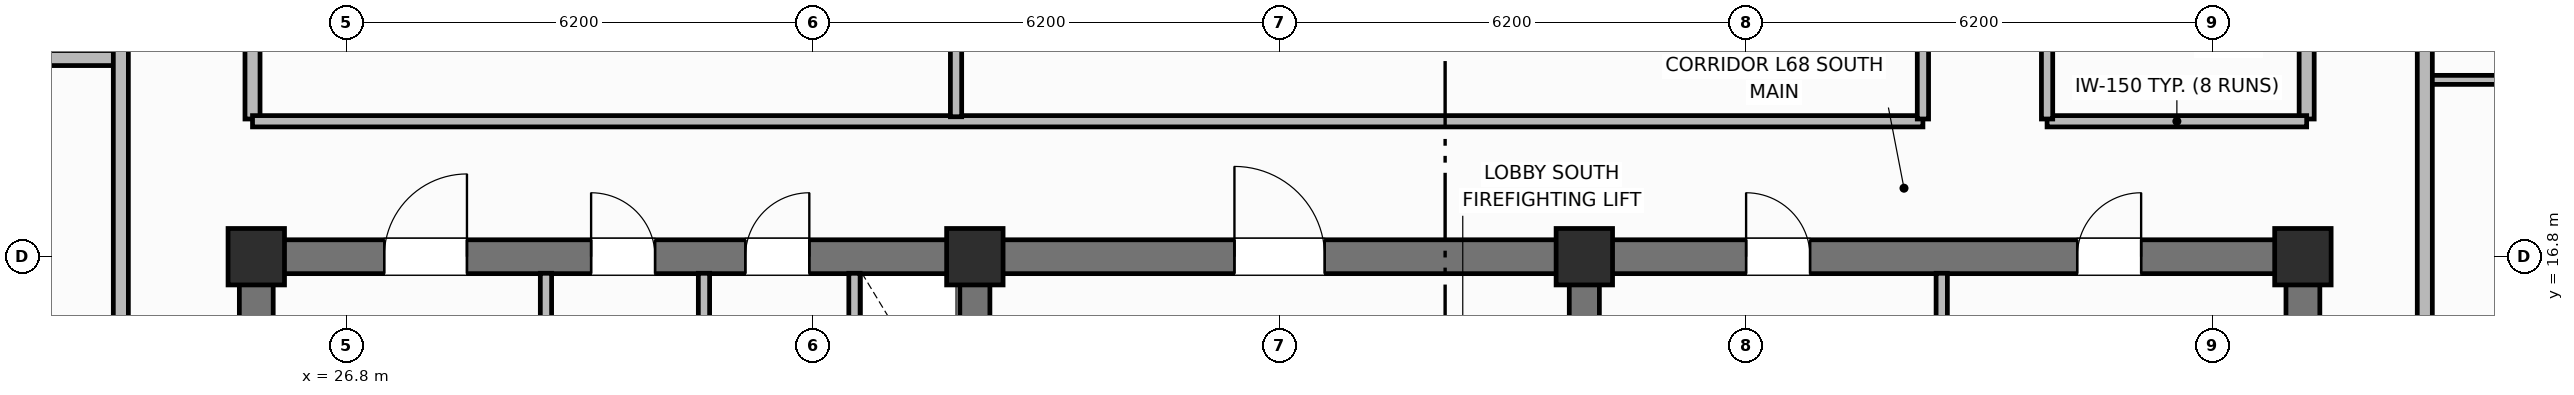
"""IFC4 building model, lengths in metres.
Left out: names, types, materials, properties, quantities, classifications, styles, units other than length and angle.
Written with IfcOpenShell. Run it as: python <this file> out.ifc"""

import sys

from ifc_helpers import new_model, si_unit, direction, frame, frame_2d, origin, origin_2d, place, context, subcontext, project, spatial, rectangle, extrude, element, fill, save


model = new_model("IFC4")
c1 = context("Model", 3, precision=1e-05, world=origin(), true_north=direction((0.0, 1.0)))
c2 = subcontext(c1, "Body", "Model", "MODEL_VIEW")
j1 = project(units=[si_unit("LENGTHUNIT", "METRE"), si_unit("PLANEANGLEUNIT", "RADIAN")], contexts=[c1])
p1 = place(None, origin())
s1 = spatial("IfcSite", under=j1, at=p1, CompositionType="ELEMENT")
p2 = place(p1, origin())
s2 = spatial("IfcBuilding", under=s1, at=p2, CompositionType="ELEMENT")
p3 = place(p2, frame((0.0, 0.0, 271.3)))
s3 = spatial("IfcBuildingStorey", under=s2, at=p3, CompositionType="ELEMENT", Elevation=271.3)
for number, where, z_axis, x_axis in (
    (1, (25.6, 10.825, 0.0), (0.0, 0.0, 1.0), (0.0, 1.0, 0.0)),
    (2, (52.8, 10.825, 0.0), (0.0, 0.0, 1.0), (0.0, 1.0, 0.0)),
):
    element("IfcWall", number, at=place(p3, frame(where, z_axis=z_axis, x_axis=x_axis)), inside=s3, PredefinedType="SHEAR", context=c2, shape_type="SweptSolid", body=[
        extrude(rectangle(XDim=5.75, YDim=0.45, at=frame_2d((2.875, 0.0))), origin(), (0.0, 0.0, 1.0), 3.7),
    ])
p4 = place(p3, frame((25.6, 16.8, 0.0), z_axis=(0.0, 0.0, 1.0), x_axis=(1.0, 0.0, 0.0)))
e3 = element("IfcWall", 3, at=p4, inside=s3, PredefinedType="SHEAR", context=c2, shape_type="SweptSolid", body=[
    extrude(rectangle(XDim=27.2, YDim=0.45, at=frame_2d((13.6, 0.0))), origin(), (0.0, 0.0, 1.0), 3.7),
])
p5 = place(p4, frame((1.7, 0.0, 0.0)))
e4 = element("IfcOpeningElement", 4, at=p5, cuts=e3, PredefinedType="OPENING", context=c2, shape_type="SweptSolid", body=[
    extrude(rectangle(XDim=1.1, YDim=2.15, at=frame_2d((0.55, 1.075))), frame((0.0, 0.235, 0.0), z_axis=(0.0, -1.0, 0.0), x_axis=(1.0, 0.0, 0.0)), (0.0, 0.0, 1.0), 0.47),
])
p6 = place(p4, frame((4.45, 0.0, 0.0)))
e5 = element("IfcOpeningElement", 5, at=p6, cuts=e3, PredefinedType="OPENING", context=c2, shape_type="SweptSolid", body=[
    extrude(rectangle(XDim=0.85, YDim=2.1, at=frame_2d((0.425, 1.05))), frame((0.0, 0.235, 0.0), z_axis=(0.0, -1.0, 0.0), x_axis=(1.0, 0.0, 0.0)), (0.0, 0.0, 1.0), 0.47),
])
p7 = place(p4, frame((6.5, 0.0, 0.0)))
e6 = element("IfcOpeningElement", 6, at=p7, cuts=e3, PredefinedType="OPENING", context=c2, shape_type="SweptSolid", body=[
    extrude(rectangle(XDim=0.85, YDim=2.1, at=frame_2d((0.425, 1.05))), frame((0.0, 0.235, 0.0), z_axis=(0.0, -1.0, 0.0), x_axis=(1.0, 0.0, 0.0)), (0.0, 0.0, 1.0), 0.47),
])
p8 = place(p4, frame((13.0, 0.0, 0.0)))
e7 = element("IfcOpeningElement", 7, at=p8, cuts=e3, PredefinedType="OPENING", context=c2, shape_type="SweptSolid", body=[
    extrude(rectangle(XDim=1.2, YDim=2.15, at=frame_2d((0.6, 1.075))), frame((0.0, 0.235, 0.0), z_axis=(0.0, -1.0, 0.0), x_axis=(1.0, 0.0, 0.0)), (0.0, 0.0, 1.0), 0.47),
])
p9 = place(p4, frame((19.8, 0.0, 0.0)))
e8 = element("IfcOpeningElement", 8, at=p9, cuts=e3, PredefinedType="OPENING", context=c2, shape_type="SweptSolid", body=[
    extrude(rectangle(XDim=0.85, YDim=2.1, at=frame_2d((0.425, 1.05))), frame((0.0, 0.235, 0.0), z_axis=(0.0, -1.0, 0.0), x_axis=(1.0, 0.0, 0.0)), (0.0, 0.0, 1.0), 0.47),
])
p10 = place(p4, frame((24.2, 0.0, 0.0)))
e9 = element("IfcOpeningElement", 9, at=p10, cuts=e3, PredefinedType="OPENING", context=c2, shape_type="SweptSolid", body=[
    extrude(rectangle(XDim=0.85, YDim=2.1, at=frame_2d((0.425, 1.05))), frame((0.0, 0.235, 0.0), z_axis=(0.0, -1.0, 0.0), x_axis=(1.0, 0.0, 0.0)), (0.0, 0.0, 1.0), 0.47),
])
for number, where, z_axis, x_axis in (
    (10, (35.15, 10.825, 0.0), (0.0, 0.0, 1.0), (0.0, 1.0, 0.0)),
    (11, (43.25, 10.825, 0.0), (0.0, 0.0, 1.0), (0.0, 1.0, 0.0)),
):
    element("IfcWall", number, at=place(p3, frame(where, z_axis=z_axis, x_axis=x_axis)), inside=s3, PredefinedType="SHEAR", context=c2, shape_type="SweptSolid", body=[
        extrude(rectangle(XDim=5.75, YDim=0.4, at=frame_2d((2.875, 0.0))), origin(), (0.0, 0.0, 1.0), 3.7),
    ])
for number, where, z_axis, x_axis in (
    (12, (25.6, 16.8, 0.0), (0.0, 0.0, 1.0), (1.0, 0.0, 0.0)),
    (13, (35.15, 16.8, 0.0), (0.0, 0.0, 1.0), (1.0, 0.0, 0.0)),
    (14, (43.25, 16.8, 0.0), (0.0, 0.0, 1.0), (1.0, 0.0, 0.0)),
    (15, (52.8, 16.8, 0.0), (0.0, 0.0, 1.0), (1.0, 0.0, 0.0)),
):
    element("IfcColumn", number, at=place(p3, frame(where, z_axis=z_axis, x_axis=x_axis)), inside=s3, PredefinedType="COLUMN", context=c2, shape_type="SweptSolid", body=[
        extrude(rectangle(XDim=0.75, YDim=0.75, at=origin_2d()), origin(), (0.0, 0.0, 1.0), 3.7),
    ])
for number, where, z_axis, x_axis in (
    (16, (29.45, 14.5, 0.0), (0.0, 0.0, 1.0), (0.0, 1.0, 0.0)),
    (17, (31.55, 14.5, 0.0), (0.0, 0.0, 1.0), (0.0, 1.0, 0.0)),
):
    element("IfcWall", number, at=place(p3, frame(where, z_axis=z_axis, x_axis=x_axis)), inside=s3, PredefinedType="PARTITIONING", context=c2, shape_type="SweptSolid", body=[
        extrude(rectangle(XDim=2.08, YDim=0.15, at=frame_2d((1.04, 0.0))), origin(), (0.0, 0.0, 1.0), 2.56),
    ])
p11 = place(p3, frame((33.55, 14.5, 0.0), z_axis=(0.0, 0.0, 1.0), x_axis=(0.0, 1.0, 0.0)))
e18 = element("IfcWall", 18, at=p11, inside=s3, PredefinedType="PARTITIONING", context=c2, shape_type="SweptSolid", body=[
    extrude(rectangle(XDim=2.08, YDim=0.15, at=frame_2d((1.04, 0.0))), origin(), (0.0, 0.0, 1.0), 2.56),
])
p12 = place(p11, frame((0.55, 0.0, 0.0)))
e19 = element("IfcOpeningElement", 19, at=p12, cuts=e18, PredefinedType="OPENING", context=c2, shape_type="SweptSolid", body=[
    extrude(rectangle(XDim=0.85, YDim=2.05, at=frame_2d((0.425, 1.025))), frame((0.0, 0.085, 0.0), z_axis=(0.0, -1.0, 0.0), x_axis=(1.0, 0.0, 0.0)), (0.0, 0.0, 1.0), 0.17),
])
p13 = place(p3, frame((48.0, 10.95, 0.0), z_axis=(0.0, 0.0, 1.0), x_axis=(0.0, 1.0, 0.0)))
e20 = element("IfcWall", 20, at=p13, inside=s3, PredefinedType="PARTITIONING", context=c2, shape_type="SweptSolid", body=[
    extrude(rectangle(XDim=5.63, YDim=0.15, at=frame_2d((2.815, 0.0))), origin(), (0.0, 0.0, 1.0), 2.56),
])
for number, where, z_axis, x_axis in (
    (21, (25.55, 18.63, 0.0), (0.0, 0.0, 1.0), (0.0, 1.0, 0.0)),
    (22, (52.85, 18.63, 0.0), (0.0, 0.0, 1.0), (0.0, 1.0, 0.0)),
):
    element("IfcWall", number, at=place(p3, frame(where, z_axis=z_axis, x_axis=x_axis)), inside=s3, PredefinedType="PARTITIONING", context=c2, shape_type="SweptSolid", body=[
        extrude(rectangle(XDim=19.14, YDim=0.2, at=frame_2d((9.57, 0.0))), origin(), (0.0, 0.0, 1.0), 2.56),
    ])
p14 = place(p3, frame((25.55, 18.6, 0.0), z_axis=(0.0, 0.0, 1.0), x_axis=(1.0, 0.0, 0.0)))
e23 = element("IfcWall", 23, at=p14, inside=s3, PredefinedType="PARTITIONING", context=c2, shape_type="SweptSolid", body=[
    extrude(rectangle(XDim=22.2, YDim=0.15, at=frame_2d((11.1, 0.0))), origin(), (0.0, 0.0, 1.0), 2.56),
])
p15 = place(p3, frame((49.4, 18.6, 0.0), z_axis=(0.0, 0.0, 1.0), x_axis=(1.0, 0.0, 0.0)))
e24 = element("IfcWall", 24, at=p15, inside=s3, PredefinedType="PARTITIONING", context=c2, shape_type="SweptSolid", body=[
    extrude(rectangle(XDim=3.45, YDim=0.15, at=frame_2d((1.725, 0.0))), origin(), (0.0, 0.0, 1.0), 2.56),
])
p16 = place(p3, frame((34.9, 18.66, 0.0), z_axis=(0.0, 0.0, 1.0), x_axis=(0.0, 1.0, 0.0)))
e25 = element("IfcWall", 25, at=p16, inside=s3, PredefinedType="PARTITIONING", context=c2, shape_type="SweptSolid", body=[
    extrude(rectangle(XDim=19.08, YDim=0.15, at=frame_2d((9.54, 0.0))), origin(), (0.0, 0.0, 1.0), 2.56),
])
p17 = place(p16, frame((5.0, 0.0, 0.0)))
e26 = element("IfcOpeningElement", 26, at=p17, cuts=e25, PredefinedType="OPENING", context=c2, shape_type="SweptSolid", body=[
    extrude(rectangle(XDim=1.0, YDim=2.15, at=frame_2d((0.5, 1.075))), frame((0.0, 0.085, 0.0), z_axis=(0.0, -1.0, 0.0), x_axis=(1.0, 0.0, 0.0)), (0.0, 0.0, 1.0), 0.17),
])
p18 = place(p3, frame((47.75, 18.63, 0.0), z_axis=(0.0, 0.0, 1.0), x_axis=(0.0, 1.0, 0.0)))
e27 = element("IfcWall", 27, at=p18, inside=s3, PredefinedType="PARTITIONING", context=c2, shape_type="SweptSolid", body=[
    extrude(rectangle(XDim=19.14, YDim=0.15, at=frame_2d((9.57, 0.0))), origin(), (0.0, 0.0, 1.0), 2.56),
])
p19 = place(p18, frame((2.4, 0.0, 0.0)))
e28 = element("IfcOpeningElement", 28, at=p19, cuts=e27, PredefinedType="OPENING", context=c2, shape_type="SweptSolid", body=[
    extrude(rectangle(XDim=0.9, YDim=2.1, at=frame_2d((0.45, 1.05))), frame((0.0, 0.085, 0.0), z_axis=(0.0, -1.0, 0.0), x_axis=(1.0, 0.0, 0.0)), (0.0, 0.0, 1.0), 0.17),
])
p20 = place(p18, frame((10.804, 0.0, 0.0)))
e29 = element("IfcOpeningElement", 29, at=p20, cuts=e27, PredefinedType="OPENING", context=c2, shape_type="SweptSolid", body=[
    extrude(rectangle(XDim=0.9, YDim=2.1, at=frame_2d((0.45, 1.05))), frame((0.0, 0.085, 0.0), z_axis=(0.0, -1.0, 0.0), x_axis=(1.0, 0.0, 0.0)), (0.0, 0.0, 1.0), 0.17),
])
p21 = place(p3, frame((49.4, 18.63, 0.0), z_axis=(0.0, 0.0, 1.0), x_axis=(0.0, 1.0, 0.0)))
e30 = element("IfcWall", 30, at=p21, inside=s3, PredefinedType="PARTITIONING", context=c2, shape_type="SweptSolid", body=[
    extrude(rectangle(XDim=19.14, YDim=0.15, at=frame_2d((9.57, 0.0))), origin(), (0.0, 0.0, 1.0), 2.56),
])
p22 = place(p21, frame((2.4, 0.0, 0.0)))
e31 = element("IfcOpeningElement", 31, at=p22, cuts=e30, PredefinedType="OPENING", context=c2, shape_type="SweptSolid", body=[
    extrude(rectangle(XDim=1.0, YDim=2.15, at=frame_2d((0.5, 1.075))), frame((0.0, 0.085, 0.0), z_axis=(0.0, -1.0, 0.0), x_axis=(1.0, 0.0, 0.0)), (0.0, 0.0, 1.0), 0.17),
])
p23 = place(p21, frame((10.804, 0.0, 0.0)))
e32 = element("IfcOpeningElement", 32, at=p23, cuts=e30, PredefinedType="OPENING", context=c2, shape_type="SweptSolid", body=[
    extrude(rectangle(XDim=1.0, YDim=2.15, at=frame_2d((0.5, 1.075))), frame((0.0, 0.085, 0.0), z_axis=(0.0, -1.0, 0.0), x_axis=(1.0, 0.0, 0.0)), (0.0, 0.0, 1.0), 0.17),
])
p24 = place(p3, frame((19.53, 19.44, 0.0), z_axis=(0.0, 0.0, 1.0), x_axis=(1.0, 0.0, 0.0)))
e33 = element("IfcWall", 33, at=p24, inside=s3, PredefinedType="PARTITIONING", context=c2, shape_type="SweptSolid", body=[
    extrude(rectangle(XDim=4.27, YDim=0.2, at=frame_2d((2.135, 0.0))), origin(), (0.0, 0.0, 1.0), 2.56),
])
p25 = place(p3, frame((23.8, 9.95, 0.0), z_axis=(0.0, 0.0, 1.0), x_axis=(0.0, 1.0, 0.0)))
e34 = element("IfcWall", 34, at=p25, inside=s3, PredefinedType="PARTITIONING", context=c2, shape_type="SweptSolid", body=[
    extrude(rectangle(XDim=36.5, YDim=0.2, at=frame_2d((18.25, 0.0))), origin(), (0.0, 0.0, 1.0), 2.56),
])
p26 = place(p25, frame((3.11, 0.0, 0.0)))
e35 = element("IfcOpeningElement", 35, at=p26, cuts=e34, PredefinedType="OPENING", context=c2, shape_type="SweptSolid", body=[
    extrude(rectangle(XDim=1.0, YDim=2.15, at=frame_2d((0.5, 1.075))), frame((0.0, 0.11, 0.0), z_axis=(0.0, -1.0, 0.0), x_axis=(1.0, 0.0, 0.0)), (0.0, 0.0, 1.0), 0.22),
])
p27 = place(p25, frame((11.99, 0.0, 0.0)))
e36 = element("IfcOpeningElement", 36, at=p27, cuts=e34, PredefinedType="OPENING", context=c2, shape_type="SweptSolid", body=[
    extrude(rectangle(XDim=1.0, YDim=2.15, at=frame_2d((0.5, 1.075))), frame((0.0, 0.11, 0.0), z_axis=(0.0, -1.0, 0.0), x_axis=(1.0, 0.0, 0.0)), (0.0, 0.0, 1.0), 0.22),
])
p28 = place(p25, frame((23.5, 0.0, 0.0)))
e37 = element("IfcOpeningElement", 37, at=p28, cuts=e34, PredefinedType="OPENING", context=c2, shape_type="SweptSolid", body=[
    extrude(rectangle(XDim=1.0, YDim=2.15, at=frame_2d((0.5, 1.075))), frame((0.0, 0.11, 0.0), z_axis=(0.0, -1.0, 0.0), x_axis=(1.0, 0.0, 0.0)), (0.0, 0.0, 1.0), 0.22),
])
p29 = place(p25, frame((31.2, 0.0, 0.0)))
e38 = element("IfcOpeningElement", 38, at=p29, cuts=e34, PredefinedType="OPENING", context=c2, shape_type="SweptSolid", body=[
    extrude(rectangle(XDim=1.0, YDim=2.15, at=frame_2d((0.5, 1.075))), frame((0.0, 0.11, 0.0), z_axis=(0.0, -1.0, 0.0), x_axis=(1.0, 0.0, 0.0)), (0.0, 0.0, 1.0), 0.22),
])
p30 = place(p3, frame((54.42, 19.15, 0.0), z_axis=(0.0, 0.0, 1.0), x_axis=(1.0, 0.0, 0.0)))
e39 = element("IfcWall", 39, at=p30, inside=s3, PredefinedType="PARTITIONING", context=c2, shape_type="SweptSolid", body=[
    extrude(rectangle(XDim=1.95, YDim=0.12, at=frame_2d((0.975, 0.0))), origin(), (0.0, 0.0, 1.0), 2.56),
])
p31 = place(p3, frame((54.42, 9.95, 0.0), z_axis=(0.0, 0.0, 1.0), x_axis=(0.0, 1.0, 0.0)))
e40 = element("IfcWall", 40, at=p31, inside=s3, PredefinedType="PARTITIONING", context=c2, shape_type="SweptSolid", body=[
    extrude(rectangle(XDim=36.5, YDim=0.2, at=frame_2d((18.25, 0.0))), origin(), (0.0, 0.0, 1.0), 2.56),
])
p32 = place(p31, frame((3.25, 0.0, 0.0)))
e41 = element("IfcOpeningElement", 41, at=p32, cuts=e40, PredefinedType="OPENING", context=c2, shape_type="SweptSolid", body=[
    extrude(rectangle(XDim=1.0, YDim=2.15, at=frame_2d((0.5, 1.075))), frame((0.0, 0.11, 0.0), z_axis=(0.0, -1.0, 0.0), x_axis=(1.0, 0.0, 0.0)), (0.0, 0.0, 1.0), 0.22),
])
p33 = place(p31, frame((14.25, 0.0, 0.0)))
e42 = element("IfcOpeningElement", 42, at=p33, cuts=e40, PredefinedType="OPENING", context=c2, shape_type="SweptSolid", body=[
    extrude(rectangle(XDim=1.0, YDim=2.15, at=frame_2d((0.5, 1.075))), frame((0.0, 0.11, 0.0), z_axis=(0.0, -1.0, 0.0), x_axis=(1.0, 0.0, 0.0)), (0.0, 0.0, 1.0), 0.22),
])
p34 = place(p5, origin())
e43 = element("IfcDoor", 43, at=p34, inside=s3, OperationType="SINGLE_SWING_RIGHT", PredefinedType="DOOR", context=c2, shape_type="SweptSolid", body=[
    extrude(rectangle(XDim=1.1, YDim=2.15, at=frame_2d((0.55, 1.075))), frame((0.0, 0.025, 0.0), z_axis=(0.0, -1.0, 0.0), x_axis=(1.0, 0.0, 0.0)), (0.0, 0.0, 1.0), 0.05),
])
fill(e4, e43)
p35 = place(p6, origin())
e44 = element("IfcDoor", 44, at=p35, inside=s3, OperationType="SINGLE_SWING_LEFT", PredefinedType="DOOR", context=c2, shape_type="SweptSolid", body=[
    extrude(rectangle(XDim=0.85, YDim=2.1, at=frame_2d((0.425, 1.05))), frame((0.0, 0.025, 0.0), z_axis=(0.0, -1.0, 0.0), x_axis=(1.0, 0.0, 0.0)), (0.0, 0.0, 1.0), 0.05),
])
fill(e5, e44)
p36 = place(p7, origin())
e45 = element("IfcDoor", 45, at=p36, inside=s3, OperationType="SINGLE_SWING_RIGHT", PredefinedType="DOOR", context=c2, shape_type="SweptSolid", body=[
    extrude(rectangle(XDim=0.85, YDim=2.1, at=frame_2d((0.425, 1.05))), frame((0.0, 0.025, 0.0), z_axis=(0.0, -1.0, 0.0), x_axis=(1.0, 0.0, 0.0)), (0.0, 0.0, 1.0), 0.05),
])
fill(e6, e45)
p37 = place(p8, origin())
e46 = element("IfcDoor", 46, at=p37, inside=s3, OperationType="SINGLE_SWING_LEFT", PredefinedType="DOOR", context=c2, shape_type="SweptSolid", body=[
    extrude(rectangle(XDim=1.2, YDim=2.15, at=frame_2d((0.6, 1.075))), frame((0.0, 0.025, 0.0), z_axis=(0.0, -1.0, 0.0), x_axis=(1.0, 0.0, 0.0)), (0.0, 0.0, 1.0), 0.05),
])
fill(e7, e46)
p38 = place(p9, origin())
e47 = element("IfcDoor", 47, at=p38, inside=s3, OperationType="SINGLE_SWING_LEFT", PredefinedType="DOOR", context=c2, shape_type="SweptSolid", body=[
    extrude(rectangle(XDim=0.85, YDim=2.1, at=frame_2d((0.425, 1.05))), frame((0.0, 0.025, 0.0), z_axis=(0.0, -1.0, 0.0), x_axis=(1.0, 0.0, 0.0)), (0.0, 0.0, 1.0), 0.05),
])
fill(e8, e47)
p39 = place(p10, origin())
e48 = element("IfcDoor", 48, at=p39, inside=s3, OperationType="SINGLE_SWING_RIGHT", PredefinedType="DOOR", context=c2, shape_type="SweptSolid", body=[
    extrude(rectangle(XDim=0.85, YDim=2.1, at=frame_2d((0.425, 1.05))), frame((0.0, 0.025, 0.0), z_axis=(0.0, -1.0, 0.0), x_axis=(1.0, 0.0, 0.0)), (0.0, 0.0, 1.0), 0.05),
])
fill(e9, e48)
save(model, sys.argv[1])
